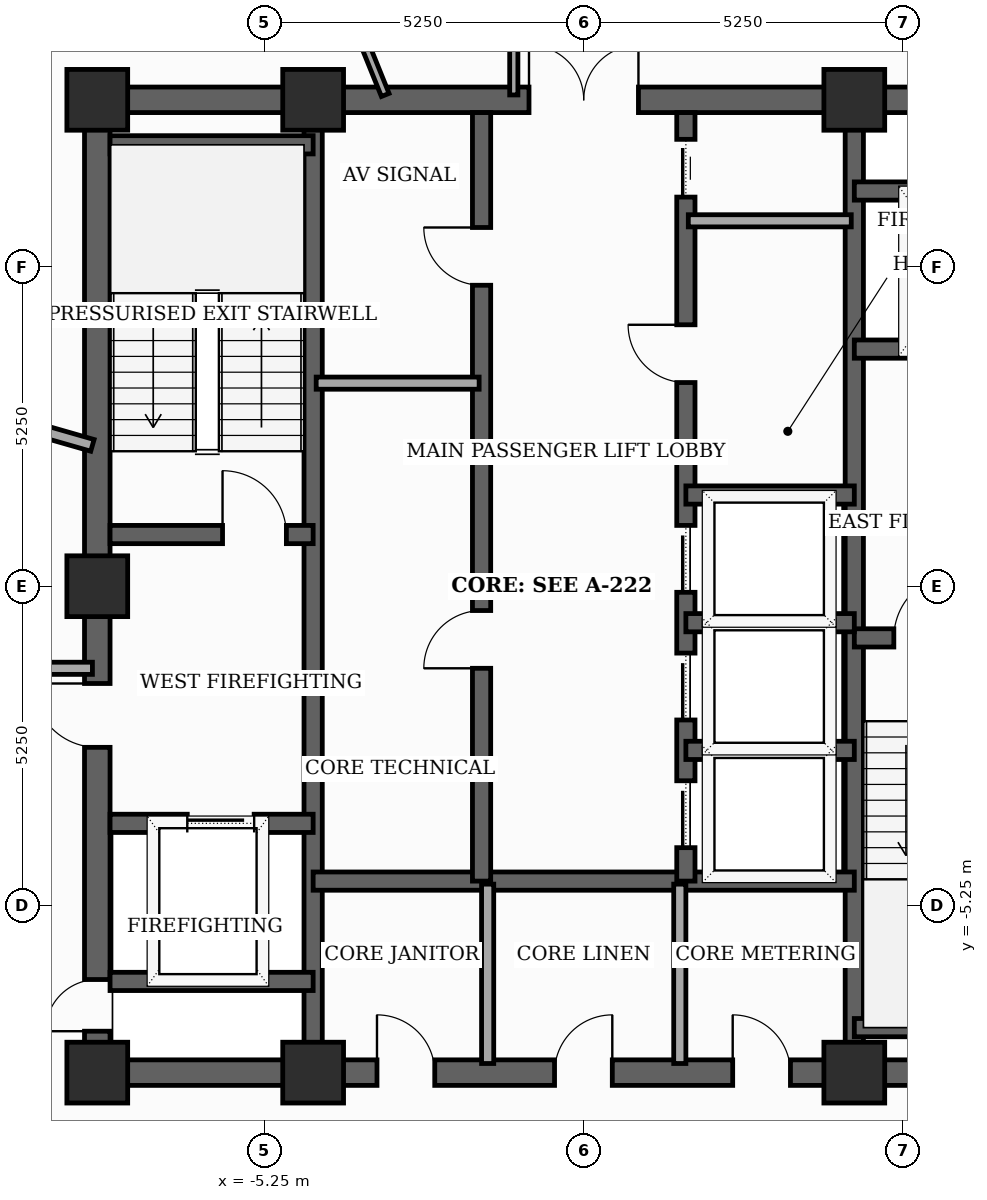
"""IFC4 building model, lengths in metres.
Left out: names, types, materials, properties, quantities, classifications, styles, units other than length and angle.
Written with IfcOpenShell. Run it as: python <this file> out.ifc"""

import sys

from ifc_helpers import new_model, si_unit, direction, frame, frame_2d, origin, origin_2d, place, context, subcontext, project, spatial, rectangle, extrude, element, fill, save


model = new_model("IFC4")
c1 = context("Model", 3, precision=1e-05, world=origin(), true_north=direction((0.0, 1.0)))
c2 = subcontext(c1, "Body", "Model", "MODEL_VIEW")
j1 = project(units=[si_unit("LENGTHUNIT", "METRE"), si_unit("PLANEANGLEUNIT", "RADIAN")], contexts=[c1])
p1 = place(None, origin())
s1 = spatial("IfcSite", under=j1, at=p1, CompositionType="ELEMENT")
p2 = place(p1, origin())
s2 = spatial("IfcBuilding", under=s1, at=p2, CompositionType="ELEMENT")
p3 = place(p2, frame((0.0, 0.0, 263.3)))
s3 = spatial("IfcBuildingStorey", under=s2, at=p3, CompositionType="ELEMENT", Elevation=263.3)
for number, where, z_axis, x_axis in (
    (1, (-8.0, -8.0, 0.0), (0.0, 0.0, 1.0), (1.0, 0.0, 0.0)),
    (2, (-4.45, -8.0, 0.0), (0.0, 0.0, 1.0), (1.0, 0.0, 0.0)),
    (3, (4.45, -8.0, 0.0), (0.0, 0.0, 1.0), (1.0, 0.0, 0.0)),
    (4, (4.45, 8.0, 0.0), (0.0, 0.0, 1.0), (1.0, 0.0, 0.0)),
    (5, (-4.45, 8.0, 0.0), (0.0, 0.0, 1.0), (1.0, 0.0, 0.0)),
    (6, (-8.0, 8.0, 0.0), (0.0, 0.0, 1.0), (1.0, 0.0, 0.0)),
    (7, (-8.0, 0.0, 0.0), (0.0, 0.0, 1.0), (1.0, 0.0, 0.0)),
):
    element("IfcColumn", number, at=place(p3, frame(where, z_axis=z_axis, x_axis=x_axis)), inside=s3, PredefinedType="COLUMN", context=c2, shape_type="SweptSolid", body=[
        extrude(rectangle(XDim=1.0, YDim=1.0, at=origin_2d()), origin(), (0.0, 0.0, 1.0), 3.7),
    ])
p4 = place(p3, frame((-8.0, -8.0, 0.0), z_axis=(0.0, 0.0, 1.0), x_axis=(0.0, 1.0, 0.0)))
e8 = element("IfcWall", 8, at=p4, inside=s3, PredefinedType="SHEAR", context=c2, shape_type="SweptSolid", body=[
    extrude(rectangle(XDim=16.0, YDim=0.42, at=frame_2d((8.0, 0.0))), origin(), (0.0, 0.0, 1.0), 3.5),
])
p5 = place(p4, frame((0.681, 0.0, 0.0)))
e9 = element("IfcOpeningElement", 9, at=p5, cuts=e8, PredefinedType="OPENING", context=c2, shape_type="SweptSolid", body=[
    extrude(rectangle(XDim=0.85, YDim=2.02, at=frame_2d((0.425, 1.01))), frame((0.0, 0.22, 0.0), z_axis=(0.0, -1.0, 0.0), x_axis=(1.0, 0.0, 0.0)), (0.0, 0.0, 1.0), 0.44),
])
p6 = place(p4, frame((5.35, 0.0, 0.0)))
e10 = element("IfcOpeningElement", 10, at=p6, cuts=e8, PredefinedType="OPENING", context=c2, shape_type="SweptSolid", body=[
    extrude(rectangle(XDim=1.05, YDim=2.15, at=frame_2d((0.525, 1.075))), frame((0.0, 0.22, 0.0), z_axis=(0.0, -1.0, 0.0), x_axis=(1.0, 0.0, 0.0)), (0.0, 0.0, 1.0), 0.44),
])
p7 = place(p3, frame((-8.0, -8.0, 0.0), z_axis=(0.0, 0.0, 1.0), x_axis=(1.0, 0.0, 0.0)))
e11 = element("IfcWall", 11, at=p7, inside=s3, PredefinedType="SHEAR", context=c2, shape_type="SweptSolid", body=[
    extrude(rectangle(XDim=16.0, YDim=0.42, at=frame_2d((8.0, 0.0))), origin(), (0.0, 0.0, 1.0), 3.5),
])
p8 = place(p7, frame((4.6, 0.0, 0.0)))
e12 = element("IfcOpeningElement", 12, at=p8, cuts=e11, PredefinedType="OPENING", context=c2, shape_type="SweptSolid", body=[
    extrude(rectangle(XDim=0.95, YDim=2.1, at=frame_2d((0.475, 1.05))), frame((0.0, 0.22, 0.0), z_axis=(0.0, -1.0, 0.0), x_axis=(1.0, 0.0, 0.0)), (0.0, 0.0, 1.0), 0.44),
])
p9 = place(p7, frame((7.52, 0.0, 0.0)))
e13 = element("IfcOpeningElement", 13, at=p9, cuts=e11, PredefinedType="OPENING", context=c2, shape_type="SweptSolid", body=[
    extrude(rectangle(XDim=0.95, YDim=2.1, at=frame_2d((0.475, 1.05))), frame((0.0, 0.22, 0.0), z_axis=(0.0, -1.0, 0.0), x_axis=(1.0, 0.0, 0.0)), (0.0, 0.0, 1.0), 0.44),
])
p10 = place(p7, frame((10.45, 0.0, 0.0)))
e14 = element("IfcOpeningElement", 14, at=p10, cuts=e11, PredefinedType="OPENING", context=c2, shape_type="SweptSolid", body=[
    extrude(rectangle(XDim=0.95, YDim=2.1, at=frame_2d((0.475, 1.05))), frame((0.0, 0.22, 0.0), z_axis=(0.0, -1.0, 0.0), x_axis=(1.0, 0.0, 0.0)), (0.0, 0.0, 1.0), 0.44),
])
p11 = place(p3, frame((-8.0, 8.0, 0.0), z_axis=(0.0, 0.0, 1.0), x_axis=(1.0, 0.0, 0.0)))
e15 = element("IfcWall", 15, at=p11, inside=s3, PredefinedType="SHEAR", context=c2, shape_type="SweptSolid", body=[
    extrude(rectangle(XDim=16.0, YDim=0.42, at=frame_2d((8.0, 0.0))), origin(), (0.0, 0.0, 1.0), 3.5),
])
p12 = place(p11, frame((7.1, 0.0, 0.0)))
e16 = element("IfcOpeningElement", 16, at=p12, cuts=e15, PredefinedType="OPENING", context=c2, shape_type="SweptSolid", body=[
    extrude(rectangle(XDim=1.8, YDim=2.15, at=frame_2d((0.9, 1.075))), frame((0.0, 0.22, 0.0), z_axis=(0.0, -1.0, 0.0), x_axis=(1.0, 0.0, 0.0)), (0.0, 0.0, 1.0), 0.44),
])
for number, where, z_axis, x_axis in (
    (17, (-4.45, -7.79, 0.0), (0.0, 0.0, 1.0), (0.0, 1.0, 0.0)),
    (18, (4.45, -7.79, 0.0), (0.0, 0.0, 1.0), (0.0, 1.0, 0.0)),
):
    element("IfcWall", number, at=place(p3, frame(where, z_axis=z_axis, x_axis=x_axis)), inside=s3, PredefinedType="SHEAR", context=c2, shape_type="SweptSolid", body=[
        extrude(rectangle(XDim=15.58, YDim=0.3, at=frame_2d((7.79, 0.0))), origin(), (0.0, 0.0, 1.0), 3.5),
    ])
p13 = place(p3, frame((-7.79, 0.85, 0.0), z_axis=(0.0, 0.0, 1.0), x_axis=(1.0, 0.0, 0.0)))
e19 = element("IfcWall", 19, at=p13, inside=s3, PredefinedType="SHEAR", context=c2, shape_type="SweptSolid", body=[
    extrude(rectangle(XDim=3.34, YDim=0.3, at=frame_2d((1.67, 0.0))), origin(), (0.0, 0.0, 1.0), 3.5),
])
p14 = place(p13, frame((1.85, 0.0, 0.0)))
e20 = element("IfcOpeningElement", 20, at=p14, cuts=e19, PredefinedType="OPENING", context=c2, shape_type="SweptSolid", body=[
    extrude(rectangle(XDim=1.05, YDim=2.15, at=frame_2d((0.525, 1.075))), frame((0.0, 0.16, 0.0), z_axis=(0.0, -1.0, 0.0), x_axis=(1.0, 0.0, 0.0)), (0.0, 0.0, 1.0), 0.32),
])
p15 = place(p3, frame((-7.79, 7.26, 0.0), z_axis=(0.0, 0.0, 1.0), x_axis=(1.0, 0.0, 0.0)))
e21 = element("IfcWall", 21, at=p15, inside=s3, PredefinedType="SHEAR", context=c2, shape_type="SweptSolid", body=[
    extrude(rectangle(XDim=3.34, YDim=0.3, at=frame_2d((1.67, 0.0))), origin(), (0.0, 0.0, 1.0), 3.5),
])
p16 = place(p3, frame((4.45, -0.85, 0.0), z_axis=(0.0, 0.0, 1.0), x_axis=(1.0, 0.0, 0.0)))
e22 = element("IfcWall", 22, at=p16, inside=s3, PredefinedType="SHEAR", context=c2, shape_type="SweptSolid", body=[
    extrude(rectangle(XDim=3.34, YDim=0.3, at=frame_2d((1.67, 0.0))), origin(), (0.0, 0.0, 1.0), 3.5),
])
p17 = place(p16, frame((0.65, 0.0, 0.0)))
e23 = element("IfcOpeningElement", 23, at=p17, cuts=e22, PredefinedType="OPENING", context=c2, shape_type="SweptSolid", body=[
    extrude(rectangle(XDim=1.05, YDim=2.15, at=frame_2d((0.525, 1.075))), frame((0.0, 0.16, 0.0), z_axis=(0.0, -1.0, 0.0), x_axis=(1.0, 0.0, 0.0)), (0.0, 0.0, 1.0), 0.32),
])
p18 = place(p3, frame((4.45, -7.26, 0.0), z_axis=(0.0, 0.0, 1.0), x_axis=(1.0, 0.0, 0.0)))
e24 = element("IfcWall", 24, at=p18, inside=s3, PredefinedType="SHEAR", context=c2, shape_type="SweptSolid", body=[
    extrude(rectangle(XDim=3.55, YDim=0.3, at=frame_2d((1.775, 0.0))), origin(), (0.0, 0.0, 1.0), 3.5),
])
p19 = place(p3, frame((-7.79, -3.9, 0.0), z_axis=(0.0, 0.0, 1.0), x_axis=(1.0, 0.0, 0.0)))
e25 = element("IfcWall", 25, at=p19, inside=s3, PredefinedType="SHEAR", context=c2, shape_type="SweptSolid", body=[
    extrude(rectangle(XDim=3.34, YDim=0.3, at=frame_2d((1.67, 0.0))), origin(), (0.0, 0.0, 1.0), 3.5),
])
p20 = place(p19, frame((1.27, 0.0, 0.0)))
e26 = element("IfcOpeningElement", 26, at=p20, cuts=e25, PredefinedType="OPENING", context=c2, shape_type="SweptSolid", body=[
    extrude(rectangle(XDim=1.1, YDim=2.1, at=frame_2d((0.55, 1.05))), frame((0.0, 0.16, 0.0), z_axis=(0.0, -1.0, 0.0), x_axis=(1.0, 0.0, 0.0)), (0.0, 0.0, 1.0), 0.32),
])
p21 = place(p3, frame((-7.79, -6.5, 0.0), z_axis=(0.0, 0.0, 1.0), x_axis=(1.0, 0.0, 0.0)))
e27 = element("IfcWall", 27, at=p21, inside=s3, PredefinedType="SHEAR", context=c2, shape_type="SweptSolid", body=[
    extrude(rectangle(XDim=3.34, YDim=0.3, at=frame_2d((1.67, 0.0))), origin(), (0.0, 0.0, 1.0), 3.5),
])
p22 = place(p3, frame((4.45, 3.9, 0.0), z_axis=(0.0, 0.0, 1.0), x_axis=(1.0, 0.0, 0.0)))
e28 = element("IfcWall", 28, at=p22, inside=s3, PredefinedType="SHEAR", context=c2, shape_type="SweptSolid", body=[
    extrude(rectangle(XDim=3.34, YDim=0.3, at=frame_2d((1.67, 0.0))), origin(), (0.0, 0.0, 1.0), 3.5),
])
p23 = place(p22, frame((1.18, 0.0, 0.0)))
e29 = element("IfcOpeningElement", 29, at=p23, cuts=e28, PredefinedType="OPENING", context=c2, shape_type="SweptSolid", body=[
    extrude(rectangle(XDim=1.1, YDim=2.1, at=frame_2d((0.55, 1.05))), frame((0.0, 0.16, 0.0), z_axis=(0.0, -1.0, 0.0), x_axis=(1.0, 0.0, 0.0)), (0.0, 0.0, 1.0), 0.32),
])
p24 = place(p3, frame((4.45, 6.5, 0.0), z_axis=(0.0, 0.0, 1.0), x_axis=(1.0, 0.0, 0.0)))
e30 = element("IfcWall", 30, at=p24, inside=s3, PredefinedType="SHEAR", context=c2, shape_type="SweptSolid", body=[
    extrude(rectangle(XDim=3.34, YDim=0.3, at=frame_2d((1.67, 0.0))), origin(), (0.0, 0.0, 1.0), 3.5),
])
p25 = place(p3, frame((-4.45, -4.85, 0.0), z_axis=(0.0, 0.0, 1.0), x_axis=(1.0, 0.0, 0.0)))
e31 = element("IfcWall", 31, at=p25, inside=s3, PredefinedType="SHEAR", context=c2, shape_type="SweptSolid", body=[
    extrude(rectangle(XDim=8.9, YDim=0.3, at=frame_2d((4.45, 0.0))), origin(), (0.0, 0.0, 1.0), 3.5),
])
p26 = place(p3, frame((-1.68, -4.85, 0.0), z_axis=(0.0, 0.0, 1.0), x_axis=(0.0, 1.0, 0.0)))
e32 = element("IfcWall", 32, at=p26, inside=s3, PredefinedType="SHEAR", context=c2, shape_type="SweptSolid", body=[
    extrude(rectangle(XDim=12.64, YDim=0.3, at=frame_2d((6.32, 0.0))), origin(), (0.0, 0.0, 1.0), 3.5),
])
p27 = place(p26, frame((3.5, 0.0, 0.0)))
e33 = element("IfcOpeningElement", 33, at=p27, cuts=e32, PredefinedType="OPENING", context=c2, shape_type="SweptSolid", body=[
    extrude(rectangle(XDim=0.95, YDim=2.1, at=frame_2d((0.475, 1.05))), frame((0.0, 0.16, 0.0), z_axis=(0.0, -1.0, 0.0), x_axis=(1.0, 0.0, 0.0)), (0.0, 0.0, 1.0), 0.32),
])
p28 = place(p26, frame((9.8, 0.0, 0.0)))
e34 = element("IfcOpeningElement", 34, at=p28, cuts=e32, PredefinedType="OPENING", context=c2, shape_type="SweptSolid", body=[
    extrude(rectangle(XDim=0.95, YDim=2.1, at=frame_2d((0.475, 1.05))), frame((0.0, 0.16, 0.0), z_axis=(0.0, -1.0, 0.0), x_axis=(1.0, 0.0, 0.0)), (0.0, 0.0, 1.0), 0.32),
])
p29 = place(p3, frame((1.68, -4.85, 0.0), z_axis=(0.0, 0.0, 1.0), x_axis=(0.0, 1.0, 0.0)))
e35 = element("IfcWall", 35, at=p29, inside=s3, PredefinedType="SHEAR", context=c2, shape_type="SweptSolid", body=[
    extrude(rectangle(XDim=12.64, YDim=0.3, at=frame_2d((6.32, 0.0))), origin(), (0.0, 0.0, 1.0), 3.5),
])
p30 = place(p29, frame((0.55, 0.0, 0.0)))
e36 = element("IfcOpeningElement", 36, at=p30, cuts=e35, PredefinedType="OPENING", context=c2, shape_type="SweptSolid", body=[
    extrude(rectangle(XDim=1.1, YDim=2.1, at=frame_2d((0.55, 1.05))), frame((0.0, 0.16, 0.0), z_axis=(0.0, -1.0, 0.0), x_axis=(1.0, 0.0, 0.0)), (0.0, 0.0, 1.0), 0.32),
])
p31 = place(p29, frame((2.65, 0.0, 0.0)))
e37 = element("IfcOpeningElement", 37, at=p31, cuts=e35, PredefinedType="OPENING", context=c2, shape_type="SweptSolid", body=[
    extrude(rectangle(XDim=1.1, YDim=2.1, at=frame_2d((0.55, 1.05))), frame((0.0, 0.16, 0.0), z_axis=(0.0, -1.0, 0.0), x_axis=(1.0, 0.0, 0.0)), (0.0, 0.0, 1.0), 0.32),
])
p32 = place(p29, frame((4.75, 0.0, 0.0)))
e38 = element("IfcOpeningElement", 38, at=p32, cuts=e35, PredefinedType="OPENING", context=c2, shape_type="SweptSolid", body=[
    extrude(rectangle(XDim=1.1, YDim=2.1, at=frame_2d((0.55, 1.05))), frame((0.0, 0.16, 0.0), z_axis=(0.0, -1.0, 0.0), x_axis=(1.0, 0.0, 0.0)), (0.0, 0.0, 1.0), 0.32),
])
p33 = place(p29, frame((8.2, 0.0, 0.0)))
e39 = element("IfcOpeningElement", 39, at=p33, cuts=e35, PredefinedType="OPENING", context=c2, shape_type="SweptSolid", body=[
    extrude(rectangle(XDim=0.95, YDim=2.1, at=frame_2d((0.475, 1.05))), frame((0.0, 0.16, 0.0), z_axis=(0.0, -1.0, 0.0), x_axis=(1.0, 0.0, 0.0)), (0.0, 0.0, 1.0), 0.32),
])
p34 = place(p29, frame((11.25, 0.0, 0.0)))
e40 = element("IfcOpeningElement", 40, at=p34, cuts=e35, PredefinedType="OPENING", context=c2, shape_type="SweptSolid", body=[
    extrude(rectangle(XDim=0.95, YDim=2.1, at=frame_2d((0.475, 1.05))), frame((0.0, 0.16, 0.0), z_axis=(0.0, -1.0, 0.0), x_axis=(1.0, 0.0, 0.0)), (0.0, 0.0, 1.0), 0.32),
])
for number, where, z_axis, x_axis in (
    (41, (1.68, 1.5, 0.0), (0.0, 0.0, 1.0), (1.0, 0.0, 0.0)),
    (42, (1.68, -2.7, 0.0), (0.0, 0.0, 1.0), (1.0, 0.0, 0.0)),
    (43, (1.68, -0.6, 0.0), (0.0, 0.0, 1.0), (1.0, 0.0, 0.0)),
):
    element("IfcWall", number, at=place(p3, frame(where, z_axis=z_axis, x_axis=x_axis)), inside=s3, PredefinedType="SHEAR", context=c2, shape_type="SweptSolid", body=[
        extrude(rectangle(XDim=2.77, YDim=0.3, at=frame_2d((1.385, 0.0))), origin(), (0.0, 0.0, 1.0), 3.5),
    ])
for number, where, z_axis, x_axis in (
    (44, (-1.58, -7.85, 0.0), (0.0, 0.0, 1.0), (0.0, 1.0, 0.0)),
    (45, (1.58, -7.85, 0.0), (0.0, 0.0, 1.0), (0.0, 1.0, 0.0)),
):
    element("IfcWall", number, at=place(p3, frame(where, z_axis=z_axis, x_axis=x_axis)), inside=s3, PredefinedType="SOLIDWALL", context=c2, shape_type="SweptSolid", body=[
        extrude(rectangle(XDim=2.95, YDim=0.2, at=frame_2d((1.475, 0.0))), origin(), (0.0, 0.0, 1.0), 2.885),
    ])
for number, where, z_axis, x_axis in (
    (46, (-4.4, 3.34, 0.0), (0.0, 0.0, 1.0), (1.0, 0.0, 0.0)),
    (47, (1.72, 6.01, 0.0), (0.0, 0.0, 1.0), (1.0, 0.0, 0.0)),
):
    element("IfcWall", number, at=place(p3, frame(where, z_axis=z_axis, x_axis=x_axis)), inside=s3, PredefinedType="SOLIDWALL", context=c2, shape_type="SweptSolid", body=[
        extrude(rectangle(XDim=2.68, YDim=0.2, at=frame_2d((1.34, 0.0))), origin(), (0.0, 0.0, 1.0), 3.5),
    ])
p35 = place(p3, frame((-8.08, -1.35, 0.0), z_axis=(0.0, 0.0, 1.0), x_axis=(-1.0, 0.0, 0.0)))
e48 = element("IfcWall", 48, at=p35, inside=s3, PredefinedType="SOLIDWALL", context=c2, shape_type="SweptSolid", body=[
    extrude(rectangle(XDim=2.57, YDim=0.2, at=frame_2d((1.285, 0.0))), origin(), (0.0, 0.0, 1.0), 2.885),
])
p36 = place(p3, frame((-1.15, 10.65, 0.0), z_axis=(0.0, 0.0, 1.0), x_axis=(0.0, -1.0, 0.0)))
e49 = element("IfcWall", 49, at=p36, inside=s3, PredefinedType="PARTITIONING", context=c2, shape_type="SweptSolid", body=[
    extrude(rectangle(XDim=2.57, YDim=0.135, at=frame_2d((1.285, 0.0))), origin(), (0.0, 0.0, 1.0), 2.885),
])
p37 = place(p3, frame((-8.08, 2.317, 0.0), z_axis=(0.0, 0.0, 1.0), x_axis=(-0.961260926499, 0.275640039155, 0.0)))
e50 = element("IfcWall", 50, at=p37, inside=s3, PredefinedType="SOLIDWALL", context=c2, shape_type="SweptSolid", body=[
    extrude(rectangle(XDim=7.333, YDim=0.2, at=frame_2d((3.667, 0.0))), origin(), (0.0, 0.0, 1.0), 2.885),
])
p38 = place(p3, frame((-5.896, 14.593, 0.0), z_axis=(0.0, 0.0, 1.0), x_axis=(0.374630268076, -0.927174289032, 0.0)))
e51 = element("IfcWall", 51, at=p38, inside=s3, PredefinedType="PARTITIONING", context=c2, shape_type="SweptSolid", body=[
    extrude(rectangle(XDim=7.024, YDim=0.135, at=frame_2d((3.512, 0.0))), origin(), (0.0, 0.0, 1.0), 2.885),
])
p39 = place(p38, frame((3.5, 0.0, 0.0)))
e52 = element("IfcOpeningElement", 52, at=p39, cuts=e51, PredefinedType="OPENING", context=c2, shape_type="SweptSolid", body=[
    extrude(rectangle(XDim=0.92, YDim=2.1, at=frame_2d((0.46, 1.05))), frame((0.0, 0.077, 0.0), z_axis=(0.0, -1.0, 0.0), x_axis=(1.0, 0.0, 0.0)), (0.0, 0.0, 1.0), 0.155),
])
p40 = place(p5, origin())
e53 = element("IfcDoor", 53, at=p40, inside=s3, OperationType="SINGLE_SWING_LEFT", PredefinedType="TRAPDOOR", context=c2, shape_type="SweptSolid", body=[
    extrude(rectangle(XDim=0.85, YDim=2.02, at=frame_2d((0.425, 1.01))), frame((0.0, 0.025, 0.0), z_axis=(0.0, -1.0, 0.0), x_axis=(1.0, 0.0, 0.0)), (0.0, 0.0, 1.0), 0.05),
])
fill(e9, e53)
p41 = place(p6, origin())
e54 = element("IfcDoor", 54, at=p41, inside=s3, OperationType="SINGLE_SWING_RIGHT", PredefinedType="DOOR", context=c2, shape_type="SweptSolid", body=[
    extrude(rectangle(XDim=1.05, YDim=2.15, at=frame_2d((0.525, 1.075))), frame((0.0, 0.025, 0.0), z_axis=(0.0, -1.0, 0.0), x_axis=(1.0, 0.0, 0.0)), (0.0, 0.0, 1.0), 0.05),
])
fill(e10, e54)
p42 = place(p8, origin())
e55 = element("IfcDoor", 55, at=p42, inside=s3, OperationType="SINGLE_SWING_LEFT", PredefinedType="DOOR", context=c2, shape_type="SweptSolid", body=[
    extrude(rectangle(XDim=0.95, YDim=2.1, at=frame_2d((0.475, 1.05))), frame((0.0, 0.025, 0.0), z_axis=(0.0, -1.0, 0.0), x_axis=(1.0, 0.0, 0.0)), (0.0, 0.0, 1.0), 0.05),
])
fill(e12, e55)
p43 = place(p9, origin())
e56 = element("IfcDoor", 56, at=p43, inside=s3, OperationType="SINGLE_SWING_RIGHT", PredefinedType="DOOR", context=c2, shape_type="SweptSolid", body=[
    extrude(rectangle(XDim=0.95, YDim=2.1, at=frame_2d((0.475, 1.05))), frame((0.0, 0.025, 0.0), z_axis=(0.0, -1.0, 0.0), x_axis=(1.0, 0.0, 0.0)), (0.0, 0.0, 1.0), 0.05),
])
fill(e13, e56)
p44 = place(p10, origin())
e57 = element("IfcDoor", 57, at=p44, inside=s3, OperationType="SINGLE_SWING_LEFT", PredefinedType="DOOR", context=c2, shape_type="SweptSolid", body=[
    extrude(rectangle(XDim=0.95, YDim=2.1, at=frame_2d((0.475, 1.05))), frame((0.0, 0.025, 0.0), z_axis=(0.0, -1.0, 0.0), x_axis=(1.0, 0.0, 0.0)), (0.0, 0.0, 1.0), 0.05),
])
fill(e14, e57)
p45 = place(p12, origin())
e58 = element("IfcDoor", 58, at=p45, inside=s3, OperationType="DOUBLE_DOOR_SINGLE_SWING", PredefinedType="DOOR", context=c2, shape_type="SweptSolid", body=[
    extrude(rectangle(XDim=1.8, YDim=2.15, at=frame_2d((0.9, 1.075))), frame((0.0, 0.025, 0.0), z_axis=(0.0, -1.0, 0.0), x_axis=(1.0, 0.0, 0.0)), (0.0, 0.0, 1.0), 0.05),
])
fill(e16, e58)
p46 = place(p14, origin())
e59 = element("IfcDoor", 59, at=p46, inside=s3, OperationType="SINGLE_SWING_LEFT", PredefinedType="DOOR", context=c2, shape_type="SweptSolid", body=[
    extrude(rectangle(XDim=1.05, YDim=2.15, at=frame_2d((0.525, 1.075))), frame((0.0, 0.025, 0.0), z_axis=(0.0, -1.0, 0.0), x_axis=(1.0, 0.0, 0.0)), (0.0, 0.0, 1.0), 0.05),
])
fill(e20, e59)
p47 = place(p17, origin())
e60 = element("IfcDoor", 60, at=p47, inside=s3, OperationType="SINGLE_SWING_RIGHT", PredefinedType="DOOR", context=c2, shape_type="SweptSolid", body=[
    extrude(rectangle(XDim=1.05, YDim=2.15, at=frame_2d((0.525, 1.075))), frame((0.0, 0.025, 0.0), z_axis=(0.0, -1.0, 0.0), x_axis=(1.0, 0.0, 0.0)), (0.0, 0.0, 1.0), 0.05),
])
fill(e23, e60)
p48 = place(p20, origin())
e61 = element("IfcDoor", 61, at=p48, inside=s3, OperationType="SLIDING_TO_LEFT", PredefinedType="DOOR", context=c2, shape_type="SweptSolid", body=[
    extrude(rectangle(XDim=1.1, YDim=2.1, at=frame_2d((0.55, 1.05))), frame((0.0, 0.025, 0.0), z_axis=(0.0, -1.0, 0.0), x_axis=(1.0, 0.0, 0.0)), (0.0, 0.0, 1.0), 0.05),
])
fill(e26, e61)
p49 = place(p27, origin())
e62 = element("IfcDoor", 62, at=p49, inside=s3, OperationType="SINGLE_SWING_LEFT", PredefinedType="DOOR", context=c2, shape_type="SweptSolid", body=[
    extrude(rectangle(XDim=0.95, YDim=2.1, at=frame_2d((0.475, 1.05))), frame((0.0, 0.025, 0.0), z_axis=(0.0, -1.0, 0.0), x_axis=(1.0, 0.0, 0.0)), (0.0, 0.0, 1.0), 0.05),
])
fill(e33, e62)
p50 = place(p28, origin())
e63 = element("IfcDoor", 63, at=p50, inside=s3, OperationType="SINGLE_SWING_RIGHT", PredefinedType="DOOR", context=c2, shape_type="SweptSolid", body=[
    extrude(rectangle(XDim=0.95, YDim=2.1, at=frame_2d((0.475, 1.05))), frame((0.0, 0.025, 0.0), z_axis=(0.0, -1.0, 0.0), x_axis=(1.0, 0.0, 0.0)), (0.0, 0.0, 1.0), 0.05),
])
fill(e34, e63)
p51 = place(p30, origin())
e64 = element("IfcDoor", 64, at=p51, inside=s3, OperationType="SLIDING_TO_LEFT", PredefinedType="DOOR", context=c2, shape_type="SweptSolid", body=[
    extrude(rectangle(XDim=1.1, YDim=2.1, at=frame_2d((0.55, 1.05))), frame((0.0, 0.025, 0.0), z_axis=(0.0, -1.0, 0.0), x_axis=(1.0, 0.0, 0.0)), (0.0, 0.0, 1.0), 0.05),
])
fill(e36, e64)
p52 = place(p31, origin())
e65 = element("IfcDoor", 65, at=p52, inside=s3, OperationType="SLIDING_TO_LEFT", PredefinedType="DOOR", context=c2, shape_type="SweptSolid", body=[
    extrude(rectangle(XDim=1.1, YDim=2.1, at=frame_2d((0.55, 1.05))), frame((0.0, 0.025, 0.0), z_axis=(0.0, -1.0, 0.0), x_axis=(1.0, 0.0, 0.0)), (0.0, 0.0, 1.0), 0.05),
])
fill(e37, e65)
p53 = place(p32, origin())
e66 = element("IfcDoor", 66, at=p53, inside=s3, OperationType="SLIDING_TO_LEFT", PredefinedType="DOOR", context=c2, shape_type="SweptSolid", body=[
    extrude(rectangle(XDim=1.1, YDim=2.1, at=frame_2d((0.55, 1.05))), frame((0.0, 0.025, 0.0), z_axis=(0.0, -1.0, 0.0), x_axis=(1.0, 0.0, 0.0)), (0.0, 0.0, 1.0), 0.05),
])
fill(e38, e66)
p54 = place(p33, origin())
e67 = element("IfcDoor", 67, at=p54, inside=s3, OperationType="SINGLE_SWING_RIGHT", PredefinedType="DOOR", context=c2, shape_type="SweptSolid", body=[
    extrude(rectangle(XDim=0.95, YDim=2.1, at=frame_2d((0.475, 1.05))), frame((0.0, 0.025, 0.0), z_axis=(0.0, -1.0, 0.0), x_axis=(1.0, 0.0, 0.0)), (0.0, 0.0, 1.0), 0.05),
])
fill(e39, e67)
p55 = place(p34, origin())
e68 = element("IfcDoor", 68, at=p55, inside=s3, OperationType="SLIDING_TO_LEFT", PredefinedType="DOOR", context=c2, shape_type="SweptSolid", body=[
    extrude(rectangle(XDim=0.95, YDim=2.1, at=frame_2d((0.475, 1.05))), frame((0.0, 0.025, 0.0), z_axis=(0.0, -1.0, 0.0), x_axis=(1.0, 0.0, 0.0)), (0.0, 0.0, 1.0), 0.05),
])
fill(e40, e68)
save(model, sys.argv[1])
